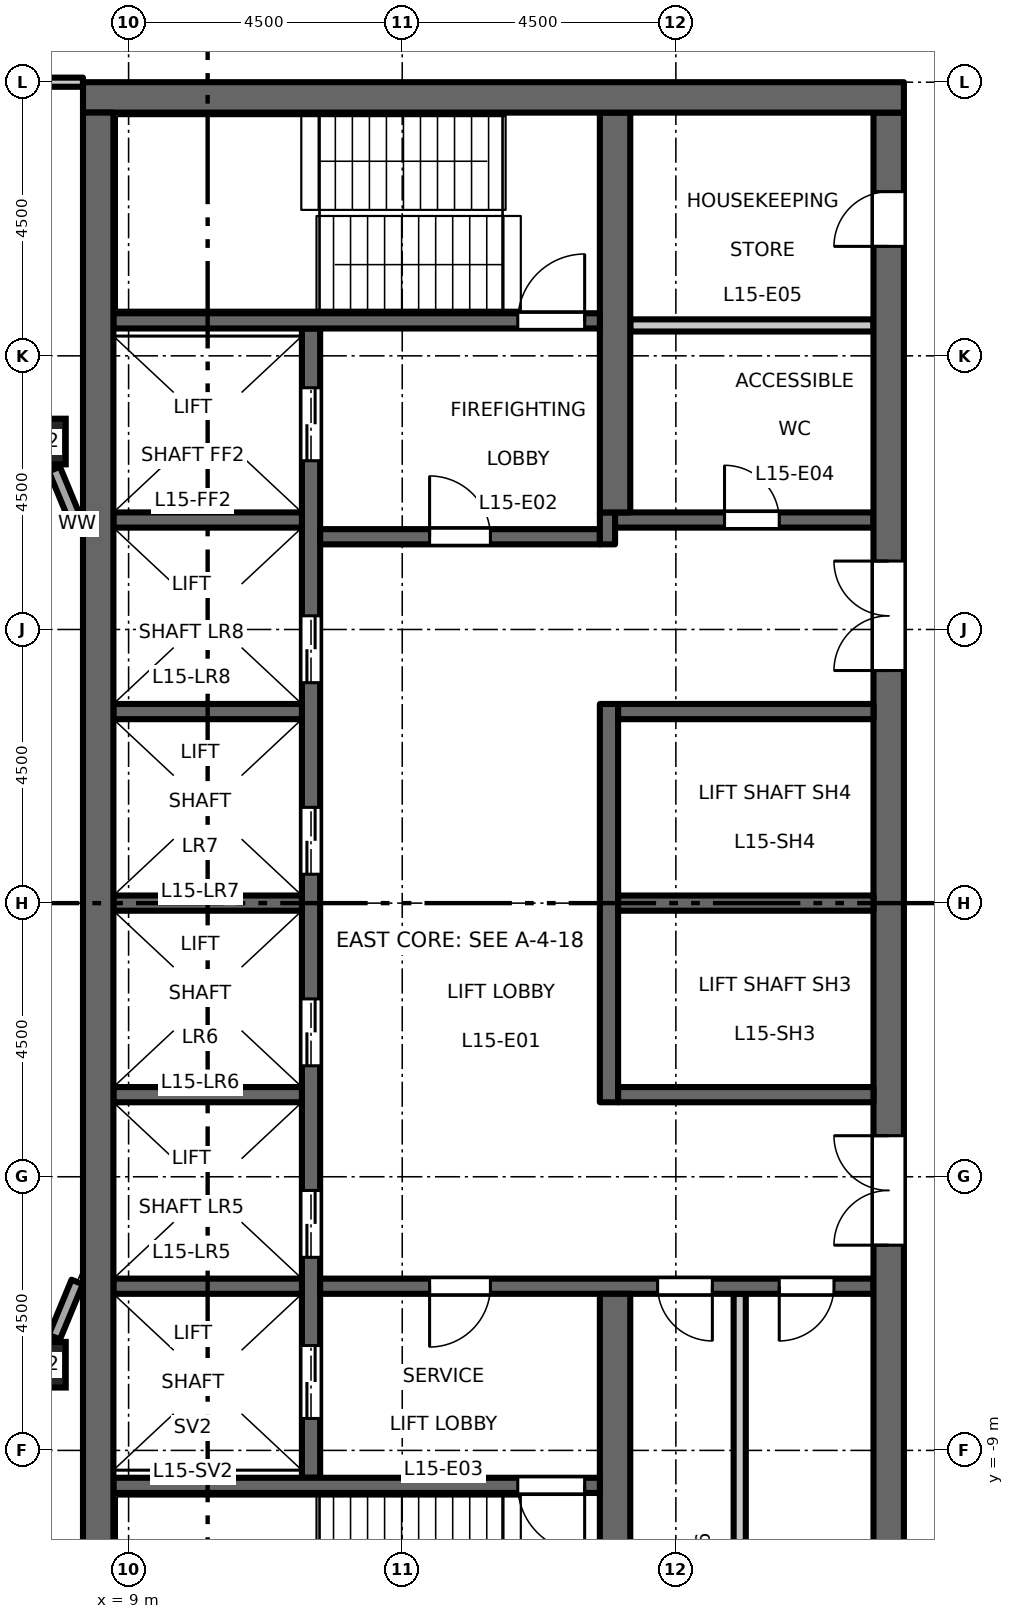
"""IFC4 building model, lengths in metres.
Left out: names, types, materials, properties, quantities, classifications, styles, units other than length and angle.
Written with IfcOpenShell. Run it as: python <this file> out.ifc"""

import sys

from ifc_helpers import new_model, si_unit, direction, frame, frame_2d, origin, origin_2d, place, context, subcontext, project, spatial, rectangle, hollow_rectangle, extrude, element, fill, save


model = new_model("IFC4")
c1 = context("Model", 3, precision=1e-05, world=origin(), true_north=direction((0.0, 1.0)))
c2 = subcontext(c1, "Body", "Model", "MODEL_VIEW")
j1 = project(units=[si_unit("LENGTHUNIT", "METRE"), si_unit("PLANEANGLEUNIT", "RADIAN")], contexts=[c1])
p1 = place(None, origin())
s1 = spatial("IfcSite", under=j1, at=p1, CompositionType="ELEMENT")
p2 = place(p1, origin())
s2 = spatial("IfcBuilding", under=s1, at=p2, CompositionType="ELEMENT")
p3 = place(p2, frame((0.0, 0.0, 71.7)))
s3 = spatial("IfcBuildingStorey", under=s2, at=p3, CompositionType="ELEMENT", Elevation=71.7)
for number, where, z_axis, x_axis in (
    (1, (7.591, -7.591, 0.0), (0.0, 0.0, 1.0), (1.0, 0.0, 0.0)),
    (2, (7.591, 7.591, 0.0), (0.0, 0.0, 1.0), (1.0, 0.0, 0.0)),
):
    element("IfcColumn", number, at=place(p3, frame(where, z_axis=z_axis, x_axis=x_axis)), inside=s3, PredefinedType="COLUMN", context=c2, shape_type="SweptSolid", body=[
        extrude(hollow_rectangle(XDim=0.75, YDim=0.75, WallThickness=0.045, at=origin_2d()), origin(), (0.0, 0.0, 1.0), 4.5),
    ])
p4 = place(p3, frame((12.0, -9.45, 0.0), z_axis=(0.0, 0.0, 1.0), x_axis=(0.0, 1.0, 0.0)))
e3 = element("IfcWall", 3, at=p4, inside=s3, PredefinedType="SHEAR", context=c2, shape_type="SweptSolid", body=[
    extrude(rectangle(XDim=18.9, YDim=0.3, at=frame_2d((9.45, 0.0))), origin(), (0.0, 0.0, 1.0), 4.35),
])
p5 = place(p4, frame((3.625, 0.0, 0.0)))
e4 = element("IfcOpeningElement", 4, at=p5, cuts=e3, PredefinedType="OPENING", context=c2, shape_type="SweptSolid", body=[
    extrude(rectangle(XDim=1.1, YDim=2.1, at=frame_2d((0.55, 1.05))), frame((0.0, 0.16, 0.0), z_axis=(0.0, -1.0, 0.0), x_axis=(1.0, 0.0, 0.0)), (0.0, 0.0, 1.0), 0.32),
])
p6 = place(p4, frame((6.775, 0.0, 0.0)))
e5 = element("IfcOpeningElement", 5, at=p6, cuts=e3, PredefinedType="OPENING", context=c2, shape_type="SweptSolid", body=[
    extrude(rectangle(XDim=1.1, YDim=2.1, at=frame_2d((0.55, 1.05))), frame((0.0, 0.16, 0.0), z_axis=(0.0, -1.0, 0.0), x_axis=(1.0, 0.0, 0.0)), (0.0, 0.0, 1.0), 0.32),
])
p7 = place(p4, frame((9.925, 0.0, 0.0)))
e6 = element("IfcOpeningElement", 6, at=p7, cuts=e3, PredefinedType="OPENING", context=c2, shape_type="SweptSolid", body=[
    extrude(rectangle(XDim=1.1, YDim=2.1, at=frame_2d((0.55, 1.05))), frame((0.0, 0.16, 0.0), z_axis=(0.0, -1.0, 0.0), x_axis=(1.0, 0.0, 0.0)), (0.0, 0.0, 1.0), 0.32),
])
p8 = place(p4, frame((13.075, 0.0, 0.0)))
e7 = element("IfcOpeningElement", 7, at=p8, cuts=e3, PredefinedType="OPENING", context=c2, shape_type="SweptSolid", body=[
    extrude(rectangle(XDim=1.1, YDim=2.1, at=frame_2d((0.55, 1.05))), frame((0.0, 0.16, 0.0), z_axis=(0.0, -1.0, 0.0), x_axis=(1.0, 0.0, 0.0)), (0.0, 0.0, 1.0), 0.32),
])
p9 = place(p4, frame((16.725, 0.0, 0.0)))
e8 = element("IfcOpeningElement", 8, at=p9, cuts=e3, PredefinedType="OPENING", context=c2, shape_type="SweptSolid", body=[
    extrude(rectangle(XDim=1.2, YDim=2.1, at=frame_2d((0.6, 1.05))), frame((0.0, 0.16, 0.0), z_axis=(0.0, -1.0, 0.0), x_axis=(1.0, 0.0, 0.0)), (0.0, 0.0, 1.0), 0.32),
])
p10 = place(p4, frame((0.975, 0.0, 0.0)))
e9 = element("IfcOpeningElement", 9, at=p10, cuts=e3, PredefinedType="OPENING", context=c2, shape_type="SweptSolid", body=[
    extrude(rectangle(XDim=1.2, YDim=2.1, at=frame_2d((0.6, 1.05))), frame((0.0, 0.16, 0.0), z_axis=(0.0, -1.0, 0.0), x_axis=(1.0, 0.0, 0.0)), (0.0, 0.0, 1.0), 0.32),
])
p11 = place(p3, frame((12.15, 6.025, 0.0), z_axis=(0.0, 0.0, 1.0), x_axis=(1.0, 0.0, 0.0)))
e10 = element("IfcWall", 10, at=p11, inside=s3, PredefinedType="SHEAR", context=c2, shape_type="SweptSolid", body=[
    extrude(rectangle(XDim=4.6, YDim=0.25, at=frame_2d((2.3, 0.0))), origin(), (0.0, 0.0, 1.0), 4.35),
])
p12 = place(p11, frame((1.8, 0.0, 0.0)))
e11 = element("IfcOpeningElement", 11, at=p12, cuts=e10, PredefinedType="OPENING", context=c2, shape_type="SweptSolid", body=[
    extrude(rectangle(XDim=1.0, YDim=2.1, at=frame_2d((0.5, 1.05))), frame((0.0, 0.135, 0.0), z_axis=(0.0, -1.0, 0.0), x_axis=(1.0, 0.0, 0.0)), (0.0, 0.0, 1.0), 0.27),
])
p13 = place(p3, frame((16.875, 5.9, 0.0), z_axis=(0.0, 0.0, 1.0), x_axis=(0.0, 1.0, 0.0)))
e12 = element("IfcWall", 12, at=p13, inside=s3, PredefinedType="SHEAR", context=c2, shape_type="SweptSolid", body=[
    extrude(rectangle(XDim=0.525, YDim=0.25, at=frame_2d((0.263, 0.0))), origin(), (0.0, 0.0, 1.0), 4.35),
])
p14 = place(p3, frame((17.0, 6.3, 0.0), z_axis=(0.0, 0.0, 1.0), x_axis=(1.0, 0.0, 0.0)))
e13 = element("IfcWall", 13, at=p14, inside=s3, PredefinedType="SHEAR", context=c2, shape_type="SweptSolid", body=[
    extrude(rectangle(XDim=4.25, YDim=0.25, at=frame_2d((2.125, 0.0))), origin(), (0.0, 0.0, 1.0), 4.35),
])
p15 = place(p14, frame((1.8, 0.0, 0.0)))
e14 = element("IfcOpeningElement", 14, at=p15, cuts=e13, PredefinedType="OPENING", context=c2, shape_type="SweptSolid", body=[
    extrude(rectangle(XDim=0.9, YDim=2.1, at=frame_2d((0.45, 1.05))), frame((0.0, 0.135, 0.0), z_axis=(0.0, -1.0, 0.0), x_axis=(1.0, 0.0, 0.0)), (0.0, 0.0, 1.0), 0.27),
])
p16 = place(p3, frame((12.15, -6.3, 0.0), z_axis=(0.0, 0.0, 1.0), x_axis=(1.0, 0.0, 0.0)))
e15 = element("IfcWall", 15, at=p16, inside=s3, PredefinedType="SHEAR", context=c2, shape_type="SweptSolid", body=[
    extrude(rectangle(XDim=9.1, YDim=0.25, at=frame_2d((4.55, 0.0))), origin(), (0.0, 0.0, 1.0), 4.35),
])
p17 = place(p16, frame((1.8, 0.0, 0.0)))
e16 = element("IfcOpeningElement", 16, at=p17, cuts=e15, PredefinedType="OPENING", context=c2, shape_type="SweptSolid", body=[
    extrude(rectangle(XDim=1.0, YDim=2.1, at=frame_2d((0.5, 1.05))), frame((0.0, 0.135, 0.0), z_axis=(0.0, -1.0, 0.0), x_axis=(1.0, 0.0, 0.0)), (0.0, 0.0, 1.0), 0.27),
])
p18 = place(p16, frame((5.55, 0.0, 0.0)))
e17 = element("IfcOpeningElement", 17, at=p18, cuts=e15, PredefinedType="OPENING", context=c2, shape_type="SweptSolid", body=[
    extrude(rectangle(XDim=0.9, YDim=2.1, at=frame_2d((0.45, 1.05))), frame((0.0, 0.135, 0.0), z_axis=(0.0, -1.0, 0.0), x_axis=(1.0, 0.0, 0.0)), (0.0, 0.0, 1.0), 0.27),
])
p19 = place(p16, frame((7.55, 0.0, 0.0)))
e18 = element("IfcOpeningElement", 18, at=p19, cuts=e15, PredefinedType="OPENING", context=c2, shape_type="SweptSolid", body=[
    extrude(rectangle(XDim=0.9, YDim=2.1, at=frame_2d((0.45, 1.05))), frame((0.0, 0.135, 0.0), z_axis=(0.0, -1.0, 0.0), x_axis=(1.0, 0.0, 0.0)), (0.0, 0.0, 1.0), 0.27),
])
p20 = place(p3, frame((21.5, -13.0, 0.0), z_axis=(0.0, 0.0, 1.0), x_axis=(0.0, 1.0, 0.0)))
e19 = element("IfcWall", 19, at=p20, inside=s3, PredefinedType="SHEAR", context=c2, shape_type="SweptSolid", body=[
    extrude(rectangle(XDim=26.0, YDim=0.5, at=frame_2d((13.0, 0.0))), origin(), (0.0, 0.0, 1.0), 4.35),
])
p21 = place(p20, frame((16.825, 0.0, 0.0)))
e20 = element("IfcOpeningElement", 20, at=p21, cuts=e19, PredefinedType="OPENING", context=c2, shape_type="SweptSolid", body=[
    extrude(rectangle(XDim=1.8, YDim=2.1, at=frame_2d((0.9, 1.05))), frame((0.0, 0.26, 0.0), z_axis=(0.0, -1.0, 0.0), x_axis=(1.0, 0.0, 0.0)), (0.0, 0.0, 1.0), 0.52),
])
p22 = place(p20, frame((7.375, 0.0, 0.0)))
e21 = element("IfcOpeningElement", 21, at=p22, cuts=e19, PredefinedType="OPENING", context=c2, shape_type="SweptSolid", body=[
    extrude(rectangle(XDim=1.8, YDim=2.1, at=frame_2d((0.9, 1.05))), frame((0.0, 0.26, 0.0), z_axis=(0.0, -1.0, 0.0), x_axis=(1.0, 0.0, 0.0)), (0.0, 0.0, 1.0), 0.52),
])
p23 = place(p20, frame((23.8, 0.0, 0.0)))
e22 = element("IfcOpeningElement", 22, at=p23, cuts=e19, PredefinedType="OPENING", context=c2, shape_type="SweptSolid", body=[
    extrude(rectangle(XDim=0.9, YDim=2.1, at=frame_2d((0.45, 1.05))), frame((0.0, 0.26, 0.0), z_axis=(0.0, -1.0, 0.0), x_axis=(1.0, 0.0, 0.0)), (0.0, 0.0, 1.0), 0.52),
])
p24 = place(p3, frame((17.25, 9.5, 0.0), z_axis=(0.0, 0.0, 1.0), x_axis=(1.0, 0.0, 0.0)))
e23 = element("IfcWall", 23, at=p24, inside=s3, PredefinedType="PARTITIONING", context=c2, shape_type="SweptSolid", body=[
    extrude(rectangle(XDim=4.0, YDim=0.2, at=frame_2d((2.0, 0.0))), origin(), (0.0, 0.0, 1.0), 4.35),
])
p25 = place(p3, frame((19.05, -13.0, 0.0), z_axis=(0.0, 0.0, 1.0), x_axis=(0.0, 1.0, 0.0)))
e24 = element("IfcWall", 24, at=p25, inside=s3, PredefinedType="PARTITIONING", context=c2, shape_type="SweptSolid", body=[
    extrude(rectangle(XDim=6.575, YDim=0.2, at=frame_2d((3.288, 0.0))), origin(), (0.0, 0.0, 1.0), 4.35),
])
p26 = place(p3, frame((16.9, -3.275, 0.0), z_axis=(0.0, 0.0, 1.0), x_axis=(0.0, 1.0, 0.0)))
e25 = element("IfcWall", 25, at=p26, inside=s3, PredefinedType="SHEAR", context=c2, shape_type="SweptSolid", body=[
    extrude(rectangle(XDim=6.55, YDim=0.3, at=frame_2d((3.275, 0.0))), origin(), (0.0, 0.0, 1.0), 4.35),
])
for number, where, z_axis, x_axis in (
    (26, (17.05, 0.0, 0.0), (0.0, 0.0, 1.0), (1.0, 0.0, 0.0)),
    (27, (17.05, 3.15, 0.0), (0.0, 0.0, 1.0), (1.0, 0.0, 0.0)),
    (28, (17.05, -3.15, 0.0), (0.0, 0.0, 1.0), (1.0, 0.0, 0.0)),
):
    element("IfcWall", number, at=place(p3, frame(where, z_axis=z_axis, x_axis=x_axis)), inside=s3, PredefinedType="SHEAR", context=c2, shape_type="SweptSolid", body=[
        extrude(rectangle(XDim=4.2, YDim=0.25, at=frame_2d((2.1, 0.0))), origin(), (0.0, 0.0, 1.0), 4.35),
    ])
for number, where, z_axis, x_axis in (
    (29, (17.0, 6.425, 0.0), (0.0, 0.0, 1.0), (0.0, 1.0, 0.0)),
    (30, (17.0, -13.0, 0.0), (0.0, 0.0, 1.0), (0.0, 1.0, 0.0)),
):
    element("IfcWall", number, at=place(p3, frame(where, z_axis=z_axis, x_axis=x_axis)), inside=s3, PredefinedType="SHEAR", context=c2, shape_type="SweptSolid", body=[
        extrude(rectangle(XDim=6.575, YDim=0.5, at=frame_2d((3.288, 0.0))), origin(), (0.0, 0.0, 1.0), 4.35),
    ])
for number, where, z_axis, x_axis in (
    (31, (8.75, 0.0, 0.0), (0.0, 0.0, 1.0), (1.0, 0.0, 0.0)),
    (32, (8.75, 3.15, 0.0), (0.0, 0.0, 1.0), (1.0, 0.0, 0.0)),
    (33, (8.75, 6.3, 0.0), (0.0, 0.0, 1.0), (1.0, 0.0, 0.0)),
    (34, (8.75, -3.15, 0.0), (0.0, 0.0, 1.0), (1.0, 0.0, 0.0)),
    (35, (8.75, -6.3, 0.0), (0.0, 0.0, 1.0), (1.0, 0.0, 0.0)),
):
    element("IfcWall", number, at=place(p3, frame(where, z_axis=z_axis, x_axis=x_axis)), inside=s3, PredefinedType="SHEAR", context=c2, shape_type="SweptSolid", body=[
        extrude(rectangle(XDim=3.1, YDim=0.25, at=frame_2d((1.55, 0.0))), origin(), (0.0, 0.0, 1.0), 4.35),
    ])
p27 = place(p3, frame((8.75, 9.575, 0.0), z_axis=(0.0, 0.0, 1.0), x_axis=(1.0, 0.0, 0.0)))
e36 = element("IfcWall", 36, at=p27, inside=s3, PredefinedType="SHEAR", context=c2, shape_type="SweptSolid", body=[
    extrude(rectangle(XDim=8.0, YDim=0.25, at=frame_2d((4.0, 0.0))), origin(), (0.0, 0.0, 1.0), 4.35),
])
p28 = place(p27, frame((6.65, 0.0, 0.0)))
e37 = element("IfcOpeningElement", 37, at=p28, cuts=e36, PredefinedType="OPENING", context=c2, shape_type="SweptSolid", body=[
    extrude(rectangle(XDim=1.1, YDim=2.1, at=frame_2d((0.55, 1.05))), frame((0.0, 0.135, 0.0), z_axis=(0.0, -1.0, 0.0), x_axis=(1.0, 0.0, 0.0)), (0.0, 0.0, 1.0), 0.27),
])
p29 = place(p3, frame((8.75, -9.575, 0.0), z_axis=(0.0, 0.0, 1.0), x_axis=(1.0, 0.0, 0.0)))
e38 = element("IfcWall", 38, at=p29, inside=s3, PredefinedType="SHEAR", context=c2, shape_type="SweptSolid", body=[
    extrude(rectangle(XDim=8.0, YDim=0.25, at=frame_2d((4.0, 0.0))), origin(), (0.0, 0.0, 1.0), 4.35),
])
p30 = place(p29, frame((6.65, 0.0, 0.0)))
e39 = element("IfcOpeningElement", 39, at=p30, cuts=e38, PredefinedType="OPENING", context=c2, shape_type="SweptSolid", body=[
    extrude(rectangle(XDim=1.1, YDim=2.1, at=frame_2d((0.55, 1.05))), frame((0.0, 0.135, 0.0), z_axis=(0.0, -1.0, 0.0), x_axis=(1.0, 0.0, 0.0)), (0.0, 0.0, 1.0), 0.27),
])
p31 = place(p3, frame((8.25, 13.25, 0.0), z_axis=(0.0, 0.0, 1.0), x_axis=(1.0, 0.0, 0.0)))
e40 = element("IfcWall", 40, at=p31, inside=s3, PredefinedType="SHEAR", context=c2, shape_type="SweptSolid", body=[
    extrude(rectangle(XDim=13.5, YDim=0.5, at=frame_2d((6.75, 0.0))), origin(), (0.0, 0.0, 1.0), 4.35),
])
p32 = place(p3, frame((8.5, -13.0, 0.0), z_axis=(0.0, 0.0, 1.0), x_axis=(0.0, 1.0, 0.0)))
e41 = element("IfcWall", 41, at=p32, inside=s3, PredefinedType="SHEAR", context=c2, shape_type="SweptSolid", body=[
    extrude(rectangle(XDim=26.0, YDim=0.5, at=frame_2d((13.0, 0.0))), origin(), (0.0, 0.0, 1.0), 4.35),
])
for number, where, z_axis, x_axis in (
    (42, (7.779, -7.138, 0.0), (0.0, 0.0, 1.0), (0.383, 0.924, 0.0)),
    (43, (8.154, 6.231, 0.0), (0.0, 0.0, 1.0), (-0.383, 0.924, 0.0)),
):
    element("IfcWall", number, at=place(p3, frame(where, z_axis=z_axis, x_axis=x_axis)), inside=s3, PredefinedType="STANDARD", context=c2, shape_type="SweptSolid", body=[
        extrude(rectangle(XDim=0.982, YDim=0.2, at=frame_2d((0.491, 0.0))), origin(), (0.0, 0.0, 1.0), 3.73),
    ])
p33 = place(p3, frame((-8.25, 13.5, 0.0), z_axis=(0.0, 0.0, 1.0), x_axis=(1.0, 0.0, 0.0)))
e44 = element("IfcWall", 44, at=p33, inside=s3, PredefinedType="PARTITIONING", context=c2, shape_type="SweptSolid", body=[
    extrude(rectangle(XDim=16.5, YDim=0.15, at=frame_2d((8.25, 0.0))), origin(), (0.0, 0.0, 1.0), 3.85),
])
p34 = place(p33, frame((1.4, 0.0, 0.0)))
e45 = element("IfcOpeningElement", 45, at=p34, cuts=e44, PredefinedType="OPENING", context=c2, shape_type="SweptSolid", body=[
    extrude(rectangle(XDim=1.0, YDim=2.1, at=frame_2d((0.5, 1.05))), frame((0.0, 0.085, 0.0), z_axis=(0.0, -1.0, 0.0), x_axis=(1.0, 0.0, 0.0)), (0.0, 0.0, 1.0), 0.17),
])
p35 = place(p33, frame((9.65, 0.0, 0.0)))
e46 = element("IfcOpeningElement", 46, at=p35, cuts=e44, PredefinedType="OPENING", context=c2, shape_type="SweptSolid", body=[
    extrude(rectangle(XDim=1.0, YDim=2.1, at=frame_2d((0.5, 1.05))), frame((0.0, 0.085, 0.0), z_axis=(0.0, -1.0, 0.0), x_axis=(1.0, 0.0, 0.0)), (0.0, 0.0, 1.0), 0.17),
])
p36 = place(p12, origin())
e47 = element("IfcDoor", 47, at=p36, inside=s3, OperationType="SINGLE_SWING_RIGHT", PredefinedType="DOOR", context=c2, shape_type="SweptSolid", body=[
    extrude(rectangle(XDim=1.0, YDim=2.1, at=frame_2d((0.5, 1.05))), frame((0.0, 0.025, 0.0), z_axis=(0.0, -1.0, 0.0), x_axis=(1.0, 0.0, 0.0)), (0.0, 0.0, 1.0), 0.05),
])
fill(e11, e47)
p37 = place(p17, origin())
e48 = element("IfcDoor", 48, at=p37, inside=s3, OperationType="SINGLE_SWING_LEFT", PredefinedType="DOOR", context=c2, shape_type="SweptSolid", body=[
    extrude(rectangle(XDim=1.0, YDim=2.1, at=frame_2d((0.5, 1.05))), frame((0.0, 0.025, 0.0), z_axis=(0.0, -1.0, 0.0), x_axis=(1.0, 0.0, 0.0)), (0.0, 0.0, 1.0), 0.05),
])
fill(e16, e48)
p38 = place(p28, origin())
e49 = element("IfcDoor", 49, at=p38, inside=s3, OperationType="SINGLE_SWING_LEFT", PredefinedType="DOOR", context=c2, shape_type="SweptSolid", body=[
    extrude(rectangle(XDim=1.1, YDim=2.1, at=frame_2d((0.55, 1.05))), frame((0.0, 0.025, 0.0), z_axis=(0.0, -1.0, 0.0), x_axis=(1.0, 0.0, 0.0)), (0.0, 0.0, 1.0), 0.05),
])
fill(e37, e49)
p39 = place(p30, origin())
e50 = element("IfcDoor", 50, at=p39, inside=s3, OperationType="SINGLE_SWING_RIGHT", PredefinedType="DOOR", context=c2, shape_type="SweptSolid", body=[
    extrude(rectangle(XDim=1.1, YDim=2.1, at=frame_2d((0.55, 1.05))), frame((0.0, 0.025, 0.0), z_axis=(0.0, -1.0, 0.0), x_axis=(1.0, 0.0, 0.0)), (0.0, 0.0, 1.0), 0.05),
])
fill(e39, e50)
p40 = place(p21, origin())
e51 = element("IfcDoor", 51, at=p40, inside=s3, OperationType="DOUBLE_DOOR_DOUBLE_SWING", PredefinedType="DOOR", context=c2, shape_type="SweptSolid", body=[
    extrude(rectangle(XDim=1.8, YDim=2.1, at=frame_2d((0.9, 1.05))), frame((0.0, 0.025, 0.0), z_axis=(0.0, -1.0, 0.0), x_axis=(1.0, 0.0, 0.0)), (0.0, 0.0, 1.0), 0.05),
])
fill(e20, e51)
p41 = place(p22, origin())
e52 = element("IfcDoor", 52, at=p41, inside=s3, OperationType="DOUBLE_DOOR_DOUBLE_SWING", PredefinedType="DOOR", context=c2, shape_type="SweptSolid", body=[
    extrude(rectangle(XDim=1.8, YDim=2.1, at=frame_2d((0.9, 1.05))), frame((0.0, 0.025, 0.0), z_axis=(0.0, -1.0, 0.0), x_axis=(1.0, 0.0, 0.0)), (0.0, 0.0, 1.0), 0.05),
])
fill(e21, e52)
p42 = place(p5, origin())
e53 = element("IfcDoor", 53, at=p42, inside=s3, OperationType="DOUBLE_DOOR_SLIDING", PredefinedType="DOOR", context=c2, shape_type="SweptSolid", body=[
    extrude(rectangle(XDim=1.1, YDim=2.1, at=frame_2d((0.55, 1.05))), frame((0.0, 0.025, 0.0), z_axis=(0.0, -1.0, 0.0), x_axis=(1.0, 0.0, 0.0)), (0.0, 0.0, 1.0), 0.05),
])
fill(e4, e53)
p43 = place(p6, origin())
e54 = element("IfcDoor", 54, at=p43, inside=s3, OperationType="DOUBLE_DOOR_SLIDING", PredefinedType="DOOR", context=c2, shape_type="SweptSolid", body=[
    extrude(rectangle(XDim=1.1, YDim=2.1, at=frame_2d((0.55, 1.05))), frame((0.0, 0.025, 0.0), z_axis=(0.0, -1.0, 0.0), x_axis=(1.0, 0.0, 0.0)), (0.0, 0.0, 1.0), 0.05),
])
fill(e5, e54)
p44 = place(p7, origin())
e55 = element("IfcDoor", 55, at=p44, inside=s3, OperationType="DOUBLE_DOOR_SLIDING", PredefinedType="DOOR", context=c2, shape_type="SweptSolid", body=[
    extrude(rectangle(XDim=1.1, YDim=2.1, at=frame_2d((0.55, 1.05))), frame((0.0, 0.025, 0.0), z_axis=(0.0, -1.0, 0.0), x_axis=(1.0, 0.0, 0.0)), (0.0, 0.0, 1.0), 0.05),
])
fill(e6, e55)
p45 = place(p8, origin())
e56 = element("IfcDoor", 56, at=p45, inside=s3, OperationType="DOUBLE_DOOR_SLIDING", PredefinedType="DOOR", context=c2, shape_type="SweptSolid", body=[
    extrude(rectangle(XDim=1.1, YDim=2.1, at=frame_2d((0.55, 1.05))), frame((0.0, 0.025, 0.0), z_axis=(0.0, -1.0, 0.0), x_axis=(1.0, 0.0, 0.0)), (0.0, 0.0, 1.0), 0.05),
])
fill(e7, e56)
p46 = place(p9, origin())
e57 = element("IfcDoor", 57, at=p46, inside=s3, OperationType="DOUBLE_DOOR_SLIDING", PredefinedType="DOOR", context=c2, shape_type="SweptSolid", body=[
    extrude(rectangle(XDim=1.2, YDim=2.1, at=frame_2d((0.6, 1.05))), frame((0.0, 0.025, 0.0), z_axis=(0.0, -1.0, 0.0), x_axis=(1.0, 0.0, 0.0)), (0.0, 0.0, 1.0), 0.05),
])
fill(e8, e57)
p47 = place(p10, origin())
e58 = element("IfcDoor", 58, at=p47, inside=s3, OperationType="DOUBLE_DOOR_SLIDING", PredefinedType="DOOR", context=c2, shape_type="SweptSolid", body=[
    extrude(rectangle(XDim=1.2, YDim=2.1, at=frame_2d((0.6, 1.05))), frame((0.0, 0.025, 0.0), z_axis=(0.0, -1.0, 0.0), x_axis=(1.0, 0.0, 0.0)), (0.0, 0.0, 1.0), 0.05),
])
fill(e9, e58)
p48 = place(p15, origin())
e59 = element("IfcDoor", 59, at=p48, inside=s3, OperationType="SINGLE_SWING_RIGHT", PredefinedType="DOOR", context=c2, shape_type="SweptSolid", body=[
    extrude(rectangle(XDim=0.9, YDim=2.1, at=frame_2d((0.45, 1.05))), frame((0.0, 0.025, 0.0), z_axis=(0.0, -1.0, 0.0), x_axis=(1.0, 0.0, 0.0)), (0.0, 0.0, 1.0), 0.05),
])
fill(e14, e59)
p49 = place(p23, origin())
e60 = element("IfcDoor", 60, at=p49, inside=s3, OperationType="SINGLE_SWING_RIGHT", PredefinedType="DOOR", context=c2, shape_type="SweptSolid", body=[
    extrude(rectangle(XDim=0.9, YDim=2.1, at=frame_2d((0.45, 1.05))), frame((0.0, 0.025, 0.0), z_axis=(0.0, -1.0, 0.0), x_axis=(1.0, 0.0, 0.0)), (0.0, 0.0, 1.0), 0.05),
])
fill(e22, e60)
p50 = place(p18, origin())
e61 = element("IfcDoor", 61, at=p50, inside=s3, OperationType="SINGLE_SWING_RIGHT", PredefinedType="DOOR", context=c2, shape_type="SweptSolid", body=[
    extrude(rectangle(XDim=0.9, YDim=2.1, at=frame_2d((0.45, 1.05))), frame((0.0, 0.025, 0.0), z_axis=(0.0, -1.0, 0.0), x_axis=(1.0, 0.0, 0.0)), (0.0, 0.0, 1.0), 0.05),
])
fill(e17, e61)
p51 = place(p19, origin())
e62 = element("IfcDoor", 62, at=p51, inside=s3, OperationType="SINGLE_SWING_LEFT", PredefinedType="DOOR", context=c2, shape_type="SweptSolid", body=[
    extrude(rectangle(XDim=0.9, YDim=2.1, at=frame_2d((0.45, 1.05))), frame((0.0, 0.025, 0.0), z_axis=(0.0, -1.0, 0.0), x_axis=(1.0, 0.0, 0.0)), (0.0, 0.0, 1.0), 0.05),
])
fill(e18, e62)
save(model, sys.argv[1])
